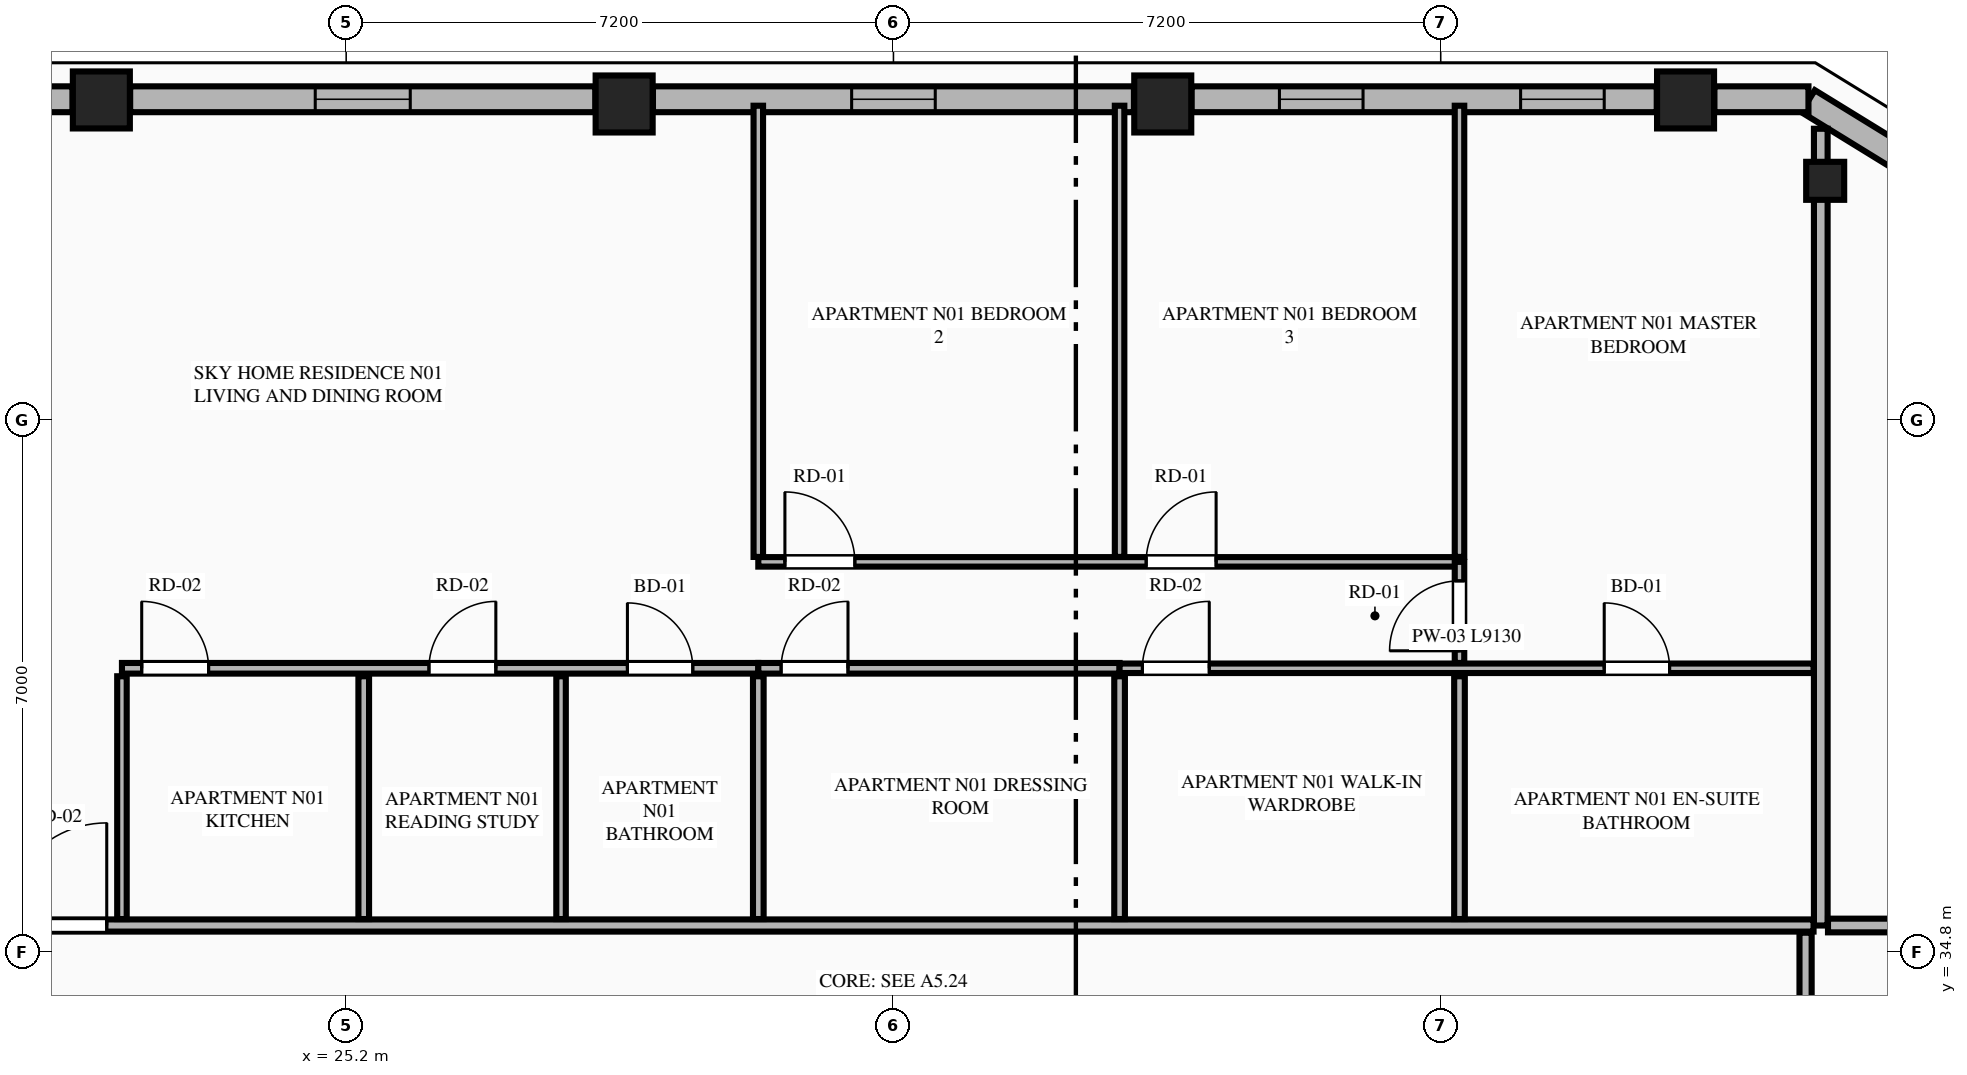
"""IFC4 building model, lengths in metres.
Left out: names, types, materials, properties, quantities, classifications, styles, units other than length and angle.
Written with IfcOpenShell. Run it as: python <this file> out.ifc"""

import sys

from ifc_helpers import new_model, si_unit, direction, frame, frame_2d, origin, origin_2d, place, context, subcontext, project, spatial, rectangle, extrude, element, fill, save


model = new_model("IFC4")
c1 = context("Model", 3, precision=1e-05, world=origin(), true_north=direction((0.0, 1.0)))
c2 = subcontext(c1, "Body", "Model", "MODEL_VIEW")
j1 = project(units=[si_unit("LENGTHUNIT", "METRE"), si_unit("PLANEANGLEUNIT", "RADIAN")], contexts=[c1])
p1 = place(None, origin())
s1 = spatial("IfcSite", under=j1, at=p1, CompositionType="ELEMENT")
p2 = place(p1, origin())
s2 = spatial("IfcBuilding", under=s1, at=p2, CompositionType="ELEMENT")
p3 = place(p2, frame((0.0, 0.0, 214.5)))
s3 = spatial("IfcBuildingStorey", under=s2, at=p3, CompositionType="ELEMENT", Elevation=214.5)
for number, where, z_axis, x_axis in (
    (1, (42.821, 46.011, 0.0), (0.0, 0.0, 1.0), (1.0, 0.0, 0.0)),
    (2, (35.943, 45.958, 0.0), (0.0, 0.0, 1.0), (1.0, 0.0, 0.0)),
    (3, (28.857, 45.958, 0.0), (0.0, 0.0, 1.0), (1.0, 0.0, 0.0)),
    (4, (21.979, 46.011, 0.0), (0.0, 0.0, 1.0), (1.0, 0.0, 0.0)),
):
    element("IfcColumn", number, at=place(p3, frame(where, z_axis=z_axis, x_axis=x_axis)), inside=s3, PredefinedType="COLUMN", context=c2, shape_type="SweptSolid", body=[
        extrude(rectangle(XDim=0.75, YDim=0.75, at=origin_2d()), origin(), (0.0, 0.0, 1.0), 3.55),
    ])
p4 = place(p3, frame((44.658, 44.947, 0.0), z_axis=(0.0, 0.0, 1.0), x_axis=(-0.865230187018, 0.501374833306, 0.0)))
e5 = element("IfcColumn", 5, at=p4, inside=s3, PredefinedType="PILASTER", context=c2, shape_type="SweptSolid", body=[
    extrude(rectangle(XDim=0.5, YDim=0.35, at=origin_2d()), origin(), (0.0, 0.0, 1.0), 3.55),
])
p5 = place(p3, frame((45.862, 45.116, 0.0), z_axis=(0.0, 0.0, 1.0), x_axis=(-0.851713271379, 0.524008113828, 0.0)))
e6 = element("IfcWall", 6, at=p5, inside=s3, PredefinedType="STANDARD", context=c2, shape_type="SweptSolid", body=[
    extrude(rectangle(XDim=1.678, YDim=0.34, at=frame_2d((0.839, 0.0))), origin(), (0.0, 0.0, 1.0), 3.35),
])
p6 = place(p3, frame((44.438, 46.02, 0.0), z_axis=(0.0, 0.0, 1.0), x_axis=(-1.0, 0.0, 0.0)))
e7 = element("IfcWall", 7, at=p6, inside=s3, PredefinedType="STANDARD", context=c2, shape_type="SweptSolid", body=[
    extrude(rectangle(XDim=1.238, YDim=0.34, at=frame_2d((0.619, 0.0))), origin(), (0.0, 0.0, 1.0), 3.35),
])
p7 = place(p3, frame((42.442, 46.02, 0.0), z_axis=(0.0, 0.0, 1.0), x_axis=(-1.0, 0.0, 0.0)))
e8 = element("IfcWall", 8, at=p7, inside=s3, PredefinedType="STANDARD", context=c2, shape_type="SweptSolid", body=[
    extrude(rectangle(XDim=6.12, YDim=0.34, at=frame_2d((3.06, 0.0))), origin(), (0.0, 0.0, 1.0), 2.883),
])
p8 = place(p7, frame((0.691, 0.0, 0.75)))
e9 = element("IfcOpeningElement", 9, at=p8, cuts=e8, PredefinedType="OPENING", context=c2, shape_type="SweptSolid", body=[
    extrude(rectangle(XDim=1.1, YDim=1.983, at=frame_2d((0.55, 0.991))), frame((0.0, 0.18, 0.0), z_axis=(0.0, -1.0, 0.0), x_axis=(1.0, 0.0, 0.0)), (0.0, 0.0, 1.0), 0.36),
])
p9 = place(p7, frame((3.864, 0.0, 0.75)))
e10 = element("IfcOpeningElement", 10, at=p9, cuts=e8, PredefinedType="OPENING", context=c2, shape_type="SweptSolid", body=[
    extrude(rectangle(XDim=1.1, YDim=1.983, at=frame_2d((0.55, 0.991))), frame((0.0, 0.18, 0.0), z_axis=(0.0, -1.0, 0.0), x_axis=(1.0, 0.0, 0.0)), (0.0, 0.0, 1.0), 0.36),
])
p10 = place(p3, frame((35.564, 46.02, 0.0), z_axis=(0.0, 0.0, 1.0), x_axis=(-1.0, 0.0, 0.0)))
e11 = element("IfcWall", 11, at=p10, inside=s3, PredefinedType="STANDARD", context=c2, shape_type="SweptSolid", body=[
    extrude(rectangle(XDim=6.328, YDim=0.34, at=frame_2d((3.164, 0.0))), origin(), (0.0, 0.0, 1.0), 2.883),
])
p11 = place(p10, frame((2.614, 0.0, 0.75)))
e12 = element("IfcOpeningElement", 12, at=p11, cuts=e11, PredefinedType="OPENING", context=c2, shape_type="SweptSolid", body=[
    extrude(rectangle(XDim=1.1, YDim=1.983, at=frame_2d((0.55, 0.991))), frame((0.0, 0.18, 0.0), z_axis=(0.0, -1.0, 0.0), x_axis=(1.0, 0.0, 0.0)), (0.0, 0.0, 1.0), 0.36),
])
p12 = place(p3, frame((28.478, 46.02, 0.0), z_axis=(0.0, 0.0, 1.0), x_axis=(-1.0, 0.0, 0.0)))
e13 = element("IfcWall", 13, at=p12, inside=s3, PredefinedType="STANDARD", context=c2, shape_type="SweptSolid", body=[
    extrude(rectangle(XDim=6.12, YDim=0.34, at=frame_2d((3.06, 0.0))), origin(), (0.0, 0.0, 1.0), 2.883),
])
p13 = place(p12, frame((2.435, 0.0, 0.75)))
e14 = element("IfcOpeningElement", 14, at=p13, cuts=e13, PredefinedType="OPENING", context=c2, shape_type="SweptSolid", body=[
    extrude(rectangle(XDim=1.25, YDim=1.95, at=frame_2d((0.625, 0.975))), frame((0.0, 0.18, 0.0), z_axis=(0.0, -1.0, 0.0), x_axis=(1.0, 0.0, 0.0)), (0.0, 0.0, 1.0), 0.36),
])
p14 = place(p3, frame((21.6, 46.02, 0.0), z_axis=(0.0, 0.0, 1.0), x_axis=(-1.0, 0.0, 0.0)))
e15 = element("IfcWall", 15, at=p14, inside=s3, PredefinedType="STANDARD", context=c2, shape_type="SweptSolid", body=[
    extrude(rectangle(XDim=1.238, YDim=0.34, at=frame_2d((0.619, 0.0))), origin(), (0.0, 0.0, 1.0), 3.35),
])
p15 = place(p3, frame((44.6, 35.15, 0.0), z_axis=(0.0, 0.0, 1.0), x_axis=(0.0, 1.0, 0.0)))
e16 = element("IfcWall", 16, at=p15, inside=s3, PredefinedType="PARTITIONING", context=c2, shape_type="SweptSolid", body=[
    extrude(rectangle(XDim=10.482, YDim=0.18, at=frame_2d((5.241, 0.0))), origin(), (0.0, 0.0, 1.0), 3.35),
])
p16 = place(p3, frame((20.295, 35.15, 0.0), z_axis=(0.0, 0.0, 1.0), x_axis=(1.0, 0.0, 0.0)))
e17 = element("IfcWall", 17, at=p16, inside=s3, PredefinedType="PARTITIONING", context=c2, shape_type="SweptSolid", body=[
    extrude(rectangle(XDim=24.21, YDim=0.16, at=frame_2d((12.105, 0.0))), origin(), (0.0, 0.0, 1.0), 3.35),
])
p17 = place(p16, frame((0.405, 0.0, 0.0)))
e18 = element("IfcOpeningElement", 18, at=p17, cuts=e17, PredefinedType="OPENING", context=c2, shape_type="SweptSolid", body=[
    extrude(rectangle(XDim=1.35, YDim=2.35, at=frame_2d((0.675, 1.175))), frame((0.0, 0.09, 0.0), z_axis=(0.0, -1.0, 0.0), x_axis=(1.0, 0.0, 0.0)), (0.0, 0.0, 1.0), 0.18),
])
p18 = place(p3, frame((22.25, 35.235, 0.0), z_axis=(0.0, 0.0, 1.0), x_axis=(0.0, 1.0, 0.0)))
e19 = element("IfcWall", 19, at=p18, inside=s3, PredefinedType="PARTITIONING", context=c2, shape_type="SweptSolid", body=[
    extrude(rectangle(XDim=3.194, YDim=0.125, at=frame_2d((1.597, 0.0))), origin(), (0.0, 0.0, 1.0), 2.807),
])
p19 = place(p3, frame((22.25, 38.534, 0.0), z_axis=(0.0, 0.0, 1.0), x_axis=(1.0, 0.0, 0.0)))
e20 = element("IfcWall", 20, at=p19, inside=s3, PredefinedType="PLUMBINGWALL", context=c2, shape_type="SweptSolid", body=[
    extrude(rectangle(XDim=8.372, YDim=0.14, at=frame_2d((4.186, 0.0))), origin(), (0.0, 0.0, 1.0), 3.35),
])
p20 = place(p19, frame((6.65, 0.0, 0.0)))
e21 = element("IfcOpeningElement", 21, at=p20, cuts=e20, PredefinedType="OPENING", context=c2, shape_type="SweptSolid", body=[
    extrude(rectangle(XDim=0.86, YDim=2.1, at=frame_2d((0.43, 1.05))), frame((0.0, 0.08, 0.0), z_axis=(0.0, -1.0, 0.0), x_axis=(1.0, 0.0, 0.0)), (0.0, 0.0, 1.0), 0.16),
])
p21 = place(p19, frame((0.26, 0.0, 0.0)))
e22 = element("IfcOpeningElement", 22, at=p21, cuts=e20, PredefinedType="OPENING", context=c2, shape_type="SweptSolid", body=[
    extrude(rectangle(XDim=0.88, YDim=2.15, at=frame_2d((0.44, 1.075))), frame((0.0, 0.08, 0.0), z_axis=(0.0, -1.0, 0.0), x_axis=(1.0, 0.0, 0.0)), (0.0, 0.0, 1.0), 0.16),
])
p22 = place(p19, frame((4.039, 0.0, 0.0)))
e23 = element("IfcOpeningElement", 23, at=p22, cuts=e20, PredefinedType="OPENING", context=c2, shape_type="SweptSolid", body=[
    extrude(rectangle(XDim=0.88, YDim=2.15, at=frame_2d((0.44, 1.075))), frame((0.0, 0.08, 0.0), z_axis=(0.0, -1.0, 0.0), x_axis=(1.0, 0.0, 0.0)), (0.0, 0.0, 1.0), 0.16),
])
p23 = place(p3, frame((30.622, 38.534, 0.0), z_axis=(0.0, 0.0, 1.0), x_axis=(1.0, 0.0, 0.0)))
e24 = element("IfcWall", 24, at=p23, inside=s3, PredefinedType="PLUMBINGWALL", context=c2, shape_type="SweptSolid", body=[
    extrude(rectangle(XDim=4.753, YDim=0.14, at=frame_2d((2.376, 0.0))), origin(), (0.0, 0.0, 1.0), 3.35),
])
p24 = place(p23, frame((0.3, 0.0, 0.0)))
e25 = element("IfcOpeningElement", 25, at=p24, cuts=e24, PredefinedType="OPENING", context=c2, shape_type="SweptSolid", body=[
    extrude(rectangle(XDim=0.88, YDim=2.15, at=frame_2d((0.44, 1.075))), frame((0.0, 0.08, 0.0), z_axis=(0.0, -1.0, 0.0), x_axis=(1.0, 0.0, 0.0)), (0.0, 0.0, 1.0), 0.16),
])
p25 = place(p3, frame((35.375, 38.534, 0.0), z_axis=(0.0, 0.0, 1.0), x_axis=(1.0, 0.0, 0.0)))
e26 = element("IfcWall", 26, at=p25, inside=s3, PredefinedType="PARTITIONING", context=c2, shape_type="SweptSolid", body=[
    extrude(rectangle(XDim=9.13, YDim=0.125, at=frame_2d((4.565, 0.0))), origin(), (0.0, 0.0, 1.0), 3.35),
])
p26 = place(p25, frame((6.376, 0.0, 0.0)))
e27 = element("IfcOpeningElement", 27, at=p26, cuts=e26, PredefinedType="OPENING", context=c2, shape_type="SweptSolid", body=[
    extrude(rectangle(XDim=0.86, YDim=2.1, at=frame_2d((0.43, 1.05))), frame((0.0, 0.073, 0.0), z_axis=(0.0, -1.0, 0.0), x_axis=(1.0, 0.0, 0.0)), (0.0, 0.0, 1.0), 0.145),
])
p27 = place(p25, frame((0.3, 0.0, 0.0)))
e28 = element("IfcOpeningElement", 28, at=p27, cuts=e26, PredefinedType="OPENING", context=c2, shape_type="SweptSolid", body=[
    extrude(rectangle(XDim=0.88, YDim=2.15, at=frame_2d((0.44, 1.075))), frame((0.0, 0.073, 0.0), z_axis=(0.0, -1.0, 0.0), x_axis=(1.0, 0.0, 0.0)), (0.0, 0.0, 1.0), 0.145),
])
p28 = place(p3, frame((25.431, 35.235, 0.0), z_axis=(0.0, 0.0, 1.0), x_axis=(0.0, 1.0, 0.0)))
e29 = element("IfcWall", 29, at=p28, inside=s3, PredefinedType="PLUMBINGWALL", context=c2, shape_type="SweptSolid", body=[
    extrude(rectangle(XDim=3.194, YDim=0.14, at=frame_2d((1.597, 0.0))), origin(), (0.0, 0.0, 1.0), 3.35),
])
p29 = place(p3, frame((28.027, 35.235, 0.0), z_axis=(0.0, 0.0, 1.0), x_axis=(0.0, 1.0, 0.0)))
e30 = element("IfcWall", 30, at=p29, inside=s3, PredefinedType="PARTITIONING", context=c2, shape_type="SweptSolid", body=[
    extrude(rectangle(XDim=3.194, YDim=0.125, at=frame_2d((1.597, 0.0))), origin(), (0.0, 0.0, 1.0), 3.35),
])
p30 = place(p3, frame((30.622, 39.999, 0.0), z_axis=(0.0, 0.0, 1.0), x_axis=(0.0, 1.0, 0.0)))
e31 = element("IfcWall", 31, at=p30, inside=s3, PredefinedType="PARTITIONING", context=c2, shape_type="SweptSolid", body=[
    extrude(rectangle(XDim=5.936, YDim=0.125, at=frame_2d((2.968, 0.0))), origin(), (0.0, 0.0, 1.0), 3.35),
])
p31 = place(p3, frame((30.622, 39.934, 0.0), z_axis=(0.0, 0.0, 1.0), x_axis=(1.0, 0.0, 0.0)))
e32 = element("IfcWall", 32, at=p31, inside=s3, PredefinedType="PARTITIONING", context=c2, shape_type="SweptSolid", body=[
    extrude(rectangle(XDim=9.225, YDim=0.125, at=frame_2d((4.612, 0.0))), origin(), (0.0, 0.0, 1.0), 3.35),
])
p32 = place(p31, frame((0.35, 0.0, 0.0)))
e33 = element("IfcOpeningElement", 33, at=p32, cuts=e32, PredefinedType="OPENING", context=c2, shape_type="SweptSolid", body=[
    extrude(rectangle(XDim=0.92, YDim=2.15, at=frame_2d((0.46, 1.075))), frame((0.0, 0.073, 0.0), z_axis=(0.0, -1.0, 0.0), x_axis=(1.0, 0.0, 0.0)), (0.0, 0.0, 1.0), 0.145),
])
p33 = place(p31, frame((5.103, 0.0, 0.0)))
e34 = element("IfcOpeningElement", 34, at=p33, cuts=e32, PredefinedType="OPENING", context=c2, shape_type="SweptSolid", body=[
    extrude(rectangle(XDim=0.92, YDim=2.15, at=frame_2d((0.46, 1.075))), frame((0.0, 0.073, 0.0), z_axis=(0.0, -1.0, 0.0), x_axis=(1.0, 0.0, 0.0)), (0.0, 0.0, 1.0), 0.145),
])
p34 = place(p3, frame((39.847, 38.604, 0.0), z_axis=(0.0, 0.0, 1.0), x_axis=(0.0, 1.0, 0.0)))
e35 = element("IfcWall", 35, at=p34, inside=s3, PredefinedType="PARTITIONING", context=c2, shape_type="SweptSolid", body=[
    extrude(rectangle(XDim=1.33, YDim=0.125, at=frame_2d((0.665, 0.0))), origin(), (0.0, 0.0, 1.0), 3.35),
])
p35 = place(p34, frame((0.16, 0.0, 0.0)))
e36 = element("IfcOpeningElement", 36, at=p35, cuts=e35, PredefinedType="OPENING", context=c2, shape_type="SweptSolid", body=[
    extrude(rectangle(XDim=0.92, YDim=2.15, at=frame_2d((0.46, 1.075))), frame((0.0, 0.073, 0.0), z_axis=(0.0, -1.0, 0.0), x_axis=(1.0, 0.0, 0.0)), (0.0, 0.0, 1.0), 0.145),
])
for number, where, z_axis, x_axis in (
    (37, (30.622, 35.235, 0.0), (0.0, 0.0, 1.0), (0.0, 1.0, 0.0)),
    (38, (35.375, 35.235, 0.0), (0.0, 0.0, 1.0), (0.0, 1.0, 0.0)),
):
    element("IfcWall", number, at=place(p3, frame(where, z_axis=z_axis, x_axis=x_axis)), inside=s3, PredefinedType="PLUMBINGWALL", context=c2, shape_type="SweptSolid", body=[
        extrude(rectangle(XDim=3.194, YDim=0.14, at=frame_2d((1.597, 0.0))), origin(), (0.0, 0.0, 1.0), 3.35),
    ])
for number, where, z_axis, x_axis in (
    (39, (35.375, 39.999, 0.0), (0.0, 0.0, 1.0), (0.0, 1.0, 0.0)),
    (40, (39.847, 39.999, 0.0), (0.0, 0.0, 1.0), (0.0, 1.0, 0.0)),
):
    element("IfcWall", number, at=place(p3, frame(where, z_axis=z_axis, x_axis=x_axis)), inside=s3, PredefinedType="PARTITIONING", context=c2, shape_type="SweptSolid", body=[
        extrude(rectangle(XDim=5.936, YDim=0.125, at=frame_2d((2.968, 0.0))), origin(), (0.0, 0.0, 1.0), 3.35),
    ])
p36 = place(p3, frame((39.847, 35.235, 0.0), z_axis=(0.0, 0.0, 1.0), x_axis=(0.0, 1.0, 0.0)))
e41 = element("IfcWall", 41, at=p36, inside=s3, PredefinedType="PLUMBINGWALL", context=c2, shape_type="SweptSolid", body=[
    extrude(rectangle(XDim=3.194, YDim=0.14, at=frame_2d((1.597, 0.0))), origin(), (0.0, 0.0, 1.0), 3.35),
])
p37 = place(p3, frame((44.695, 35.15, 0.0), z_axis=(0.0, 0.0, 1.0), x_axis=(1.0, 0.0, 0.0)))
e42 = element("IfcWall", 42, at=p37, inside=s3, PredefinedType="PARTITIONING", context=c2, shape_type="SweptSolid", body=[
    extrude(rectangle(XDim=5.995, YDim=0.18, at=frame_2d((2.998, 0.0))), origin(), (0.0, 0.0, 1.0), 3.35),
])
p38 = place(p3, frame((44.4, 26.173, 0.0), z_axis=(0.0, 0.0, 1.0), x_axis=(0.0, 1.0, 0.0)))
e43 = element("IfcWall", 43, at=p38, inside=s3, PredefinedType="PARTITIONING", context=c2, shape_type="SweptSolid", body=[
    extrude(rectangle(XDim=8.882, YDim=0.16, at=frame_2d((4.441, 0.0))), origin(), (0.0, 0.0, 1.0), 3.35),
])
p39 = place(p38, frame((0.4, 0.0, 0.0)))
e44 = element("IfcOpeningElement", 44, at=p39, cuts=e43, PredefinedType="OPENING", context=c2, shape_type="SweptSolid", body=[
    extrude(rectangle(XDim=1.02, YDim=2.25, at=frame_2d((0.51, 1.125))), frame((0.0, 0.09, 0.0), z_axis=(0.0, -1.0, 0.0), x_axis=(1.0, 0.0, 0.0)), (0.0, 0.0, 1.0), 0.18),
])
p40 = place(p8, origin())
e45 = element("IfcWindow", 45, at=p40, inside=s3, PartitioningType="SINGLE_PANEL", PredefinedType="WINDOW", context=c2, shape_type="SweptSolid", body=[
    extrude(rectangle(XDim=1.1, YDim=1.983, at=frame_2d((0.55, 0.991))), frame((0.0, 0.03, 0.0), z_axis=(0.0, -1.0, 0.0), x_axis=(1.0, 0.0, 0.0)), (0.0, 0.0, 1.0), 0.06),
])
fill(e9, e45)
p41 = place(p11, origin())
e46 = element("IfcWindow", 46, at=p41, inside=s3, PartitioningType="SINGLE_PANEL", PredefinedType="WINDOW", context=c2, shape_type="SweptSolid", body=[
    extrude(rectangle(XDim=1.1, YDim=1.983, at=frame_2d((0.55, 0.991))), frame((0.0, 0.03, 0.0), z_axis=(0.0, -1.0, 0.0), x_axis=(1.0, 0.0, 0.0)), (0.0, 0.0, 1.0), 0.06),
])
fill(e12, e46)
p42 = place(p13, origin())
e47 = element("IfcWindow", 47, at=p42, inside=s3, PartitioningType="SINGLE_PANEL", PredefinedType="WINDOW", context=c2, shape_type="SweptSolid", body=[
    extrude(rectangle(XDim=1.25, YDim=1.95, at=frame_2d((0.625, 0.975))), frame((0.0, 0.03, 0.0), z_axis=(0.0, -1.0, 0.0), x_axis=(1.0, 0.0, 0.0)), (0.0, 0.0, 1.0), 0.06),
])
fill(e14, e47)
p43 = place(p20, origin())
e48 = element("IfcDoor", 48, at=p43, inside=s3, OperationType="SINGLE_SWING_LEFT", PredefinedType="DOOR", context=c2, shape_type="SweptSolid", body=[
    extrude(rectangle(XDim=0.86, YDim=2.1, at=frame_2d((0.43, 1.05))), frame((0.0, 0.025, 0.0), z_axis=(0.0, -1.0, 0.0), x_axis=(1.0, 0.0, 0.0)), (0.0, 0.0, 1.0), 0.05),
])
fill(e21, e48)
p44 = place(p26, origin())
e49 = element("IfcDoor", 49, at=p44, inside=s3, OperationType="SINGLE_SWING_LEFT", PredefinedType="DOOR", context=c2, shape_type="SweptSolid", body=[
    extrude(rectangle(XDim=0.86, YDim=2.1, at=frame_2d((0.43, 1.05))), frame((0.0, 0.025, 0.0), z_axis=(0.0, -1.0, 0.0), x_axis=(1.0, 0.0, 0.0)), (0.0, 0.0, 1.0), 0.05),
])
fill(e27, e49)
p45 = place(p17, origin())
e50 = element("IfcDoor", 50, at=p45, inside=s3, OperationType="SINGLE_SWING_RIGHT", PredefinedType="DOOR", context=c2, shape_type="SweptSolid", body=[
    extrude(rectangle(XDim=1.35, YDim=2.35, at=frame_2d((0.675, 1.175))), frame((0.0, 0.025, 0.0), z_axis=(0.0, -1.0, 0.0), x_axis=(1.0, 0.0, 0.0)), (0.0, 0.0, 1.0), 0.05),
])
fill(e18, e50)
p46 = place(p21, origin())
e51 = element("IfcDoor", 51, at=p46, inside=s3, OperationType="SINGLE_SWING_LEFT", PredefinedType="DOOR", context=c2, shape_type="SweptSolid", body=[
    extrude(rectangle(XDim=0.88, YDim=2.15, at=frame_2d((0.44, 1.075))), frame((0.0, 0.025, 0.0), z_axis=(0.0, -1.0, 0.0), x_axis=(1.0, 0.0, 0.0)), (0.0, 0.0, 1.0), 0.05),
])
fill(e22, e51)
p47 = place(p22, origin())
e52 = element("IfcDoor", 52, at=p47, inside=s3, OperationType="SINGLE_SWING_RIGHT", PredefinedType="DOOR", context=c2, shape_type="SweptSolid", body=[
    extrude(rectangle(XDim=0.88, YDim=2.15, at=frame_2d((0.44, 1.075))), frame((0.0, 0.025, 0.0), z_axis=(0.0, -1.0, 0.0), x_axis=(1.0, 0.0, 0.0)), (0.0, 0.0, 1.0), 0.05),
])
fill(e23, e52)
p48 = place(p24, origin())
e53 = element("IfcDoor", 53, at=p48, inside=s3, OperationType="SINGLE_SWING_RIGHT", PredefinedType="DOOR", context=c2, shape_type="SweptSolid", body=[
    extrude(rectangle(XDim=0.88, YDim=2.15, at=frame_2d((0.44, 1.075))), frame((0.0, 0.025, 0.0), z_axis=(0.0, -1.0, 0.0), x_axis=(1.0, 0.0, 0.0)), (0.0, 0.0, 1.0), 0.05),
])
fill(e25, e53)
p49 = place(p32, origin())
e54 = element("IfcDoor", 54, at=p49, inside=s3, OperationType="SINGLE_SWING_LEFT", PredefinedType="DOOR", context=c2, shape_type="SweptSolid", body=[
    extrude(rectangle(XDim=0.92, YDim=2.15, at=frame_2d((0.46, 1.075))), frame((0.0, 0.025, 0.0), z_axis=(0.0, -1.0, 0.0), x_axis=(1.0, 0.0, 0.0)), (0.0, 0.0, 1.0), 0.05),
])
fill(e33, e54)
p50 = place(p33, origin())
e55 = element("IfcDoor", 55, at=p50, inside=s3, OperationType="SINGLE_SWING_RIGHT", PredefinedType="DOOR", context=c2, shape_type="SweptSolid", body=[
    extrude(rectangle(XDim=0.92, YDim=2.15, at=frame_2d((0.46, 1.075))), frame((0.0, 0.025, 0.0), z_axis=(0.0, -1.0, 0.0), x_axis=(1.0, 0.0, 0.0)), (0.0, 0.0, 1.0), 0.05),
])
fill(e34, e55)
p51 = place(p35, origin())
e56 = element("IfcDoor", 56, at=p51, inside=s3, OperationType="SINGLE_SWING_LEFT", PredefinedType="DOOR", context=c2, shape_type="SweptSolid", body=[
    extrude(rectangle(XDim=0.92, YDim=2.15, at=frame_2d((0.46, 1.075))), frame((0.0, 0.025, 0.0), z_axis=(0.0, -1.0, 0.0), x_axis=(1.0, 0.0, 0.0)), (0.0, 0.0, 1.0), 0.05),
])
fill(e36, e56)
p52 = place(p27, origin())
e57 = element("IfcDoor", 57, at=p52, inside=s3, OperationType="SINGLE_SWING_RIGHT", PredefinedType="DOOR", context=c2, shape_type="SweptSolid", body=[
    extrude(rectangle(XDim=0.88, YDim=2.15, at=frame_2d((0.44, 1.075))), frame((0.0, 0.025, 0.0), z_axis=(0.0, -1.0, 0.0), x_axis=(1.0, 0.0, 0.0)), (0.0, 0.0, 1.0), 0.05),
])
fill(e28, e57)
p53 = place(p9, origin())
e58 = element("IfcWindow", 58, at=p53, inside=s3, PartitioningType="SINGLE_PANEL", PredefinedType="WINDOW", context=c2, shape_type="SweptSolid", body=[
    extrude(rectangle(XDim=1.1, YDim=1.983, at=frame_2d((0.55, 0.991))), frame((0.0, 0.03, 0.0), z_axis=(0.0, -1.0, 0.0), x_axis=(1.0, 0.0, 0.0)), (0.0, 0.0, 1.0), 0.06),
])
fill(e10, e58)
save(model, sys.argv[1])
